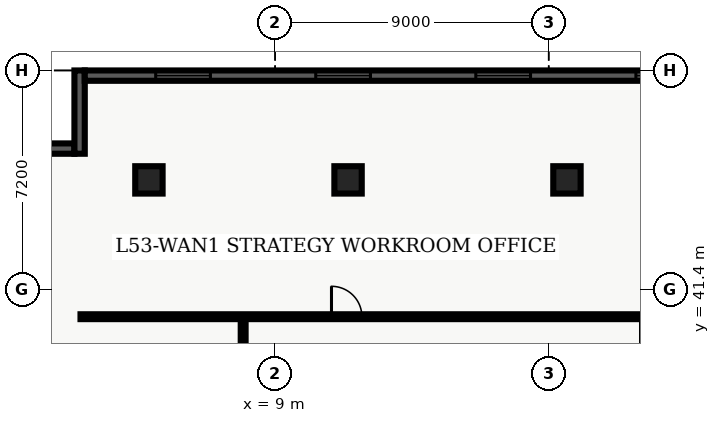
"""IFC4 building model, lengths in metres.
Left out: names, types, materials, properties, quantities, classifications, styles, units other than length and angle.
Written with IfcOpenShell. Run it as: python <this file> out.ifc"""

import sys

from ifc_helpers import new_model, entity, si_unit, converted_unit, direction, frame, origin_with_axes, origin_2d_with_axis, place, context, subcontext, project, spatial, polyline, rectangle, outline, extrude, element, fill, save


model = new_model("IFC4")
c1 = context("Model", 3, precision=1e-05, world=origin_with_axes(), true_north=direction((0.0, 1.0)))
c2 = subcontext(c1, "Body", "Model", "MODEL_VIEW")
j1 = project(units=[si_unit("LENGTHUNIT", "METRE"), converted_unit("PLANEANGLEUNIT", "DEGREE", entity("IfcPlaneAngleMeasure", 0.017), si_unit("PLANEANGLEUNIT", "RADIAN"), dimensions=[0, 0, 0, 0, 0, 0, 0])], contexts=[c1])
p1 = place(None, origin_with_axes())
s1 = spatial("IfcSite", under=j1, at=p1, CompositionType="ELEMENT")
p2 = place(p1, origin_with_axes())
s2 = spatial("IfcBuilding", under=s1, at=p2, CompositionType="ELEMENT")
p3 = place(p2, frame((0.0, 0.0, 216.0), z_axis=(0.0, 0.0, 1.0), x_axis=(1.0, 0.0, 0.0)))
s3 = spatial("IfcBuildingStorey", under=s2, at=p3, CompositionType="ELEMENT", Elevation=216.0)
for number, where, z_axis, x_axis in (
    (1, (11.4, 45.0, 0.0), (0.0, 0.0, 1.0), (1.0, 0.0, 0.0)),
    (2, (18.6, 45.0, 0.0), (0.0, 0.0, 1.0), (1.0, 0.0, 0.0)),
    (3, (4.85, 45.0, 0.0), (0.0, 0.0, 1.0), (1.0, 0.0, 0.0)),
):
    element("IfcColumn", number, at=place(p3, frame(where, z_axis=z_axis, x_axis=x_axis)), inside=s3, PredefinedType="COLUMN", context=c2, shape_type="SweptSolid", body=[
        extrude(rectangle(XDim=0.9, YDim=0.9, at=origin_2d_with_axis()), origin_with_axes(), (0.0, 0.0, 1.0), 3.9),
    ])
p4 = place(p3, frame((2.6, 40.5, 0.0), z_axis=(0.0, 0.0, 1.0), x_axis=(1.0, 0.0, 0.0)))
e4 = element("IfcWall", 4, at=p4, inside=s3, PredefinedType="PARTITIONING", context=c2, shape_type="SweptSolid", body=[
    extrude(outline(polyline([(0.0, -0.08), (29.465, -0.08), (29.465, 0.08), (0.0, 0.08), (0.0, -0.08)])), origin_with_axes(), (0.0, 0.0, 1.0), 2.64),
])
p5 = place(p4, frame((8.755, 0.0, 0.0), z_axis=(0.0, 0.0, 1.0), x_axis=(1.0, 0.0, 0.0)))
e5 = element("IfcOpeningElement", 5, at=p5, cuts=e4, PredefinedType="OPENING", context=c2, shape_type="SweptSolid", body=[
    extrude(rectangle(XDim=1.0, YDim=0.18, at=origin_2d_with_axis()), origin_with_axes(), (0.0, 0.0, 1.0), 2.15),
])
p6 = place(p3, frame((7.95, 7.8, 0.0), z_axis=(0.0, 0.0, 1.0), x_axis=(0.0, 1.0, 0.0)))
e6 = element("IfcWall", 6, at=p6, inside=s3, PredefinedType="PARTITIONING", context=c2, shape_type="SweptSolid", body=[
    extrude(outline(polyline([(0.0, -0.08), (32.7, -0.08), (32.7, 0.08), (0.0, 0.08), (0.0, -0.08)])), origin_with_axes(), (0.0, 0.0, 1.0), 2.64),
])
p7 = place(p6, frame((2.739, 0.0, 0.0), z_axis=(0.0, 0.0, 1.0), x_axis=(1.0, 0.0, 0.0)))
e7 = element("IfcOpeningElement", 7, at=p7, cuts=e6, PredefinedType="OPENING", context=c2, shape_type="SweptSolid", body=[
    extrude(rectangle(XDim=1.0, YDim=0.18, at=origin_2d_with_axis()), origin_with_axes(), (0.0, 0.0, 1.0), 2.15),
])
p8 = place(p6, frame((8.441, 0.0, 0.0), z_axis=(0.0, 0.0, 1.0), x_axis=(1.0, 0.0, 0.0)))
e8 = element("IfcOpeningElement", 8, at=p8, cuts=e6, PredefinedType="OPENING", context=c2, shape_type="SweptSolid", body=[
    extrude(rectangle(XDim=1.0, YDim=0.18, at=origin_2d_with_axis()), origin_with_axes(), (0.0, 0.0, 1.0), 2.15),
])
p9 = place(p6, frame((15.172, 0.0, 0.0), z_axis=(0.0, 0.0, 1.0), x_axis=(1.0, 0.0, 0.0)))
e9 = element("IfcOpeningElement", 9, at=p9, cuts=e6, PredefinedType="OPENING", context=c2, shape_type="SweptSolid", body=[
    extrude(rectangle(XDim=1.0, YDim=0.18, at=origin_2d_with_axis()), origin_with_axes(), (0.0, 0.0, 1.0), 2.15),
])
p10 = place(p6, frame((20.736, 0.0, 0.0), z_axis=(0.0, 0.0, 1.0), x_axis=(1.0, 0.0, 0.0)))
e10 = element("IfcOpeningElement", 10, at=p10, cuts=e6, PredefinedType="OPENING", context=c2, shape_type="SweptSolid", body=[
    extrude(rectangle(XDim=1.0, YDim=0.18, at=origin_2d_with_axis()), origin_with_axes(), (0.0, 0.0, 1.0), 2.15),
])
p11 = place(p6, frame((24.909, 0.0, 0.0), z_axis=(0.0, 0.0, 1.0), x_axis=(1.0, 0.0, 0.0)))
e11 = element("IfcOpeningElement", 11, at=p11, cuts=e6, PredefinedType="OPENING", context=c2, shape_type="SweptSolid", body=[
    extrude(rectangle(XDim=1.0, YDim=0.18, at=origin_2d_with_axis()), origin_with_axes(), (0.0, 0.0, 1.0), 2.15),
])
p12 = place(p6, frame((29.862, 0.0, 0.0), z_axis=(0.0, 0.0, 1.0), x_axis=(1.0, 0.0, 0.0)))
e12 = element("IfcOpeningElement", 12, at=p12, cuts=e6, PredefinedType="OPENING", context=c2, shape_type="SweptSolid", body=[
    extrude(rectangle(XDim=1.0, YDim=0.18, at=origin_2d_with_axis()), origin_with_axes(), (0.0, 0.0, 1.0), 2.15),
])
p13 = place(p3, frame((0.34, 46.03, 0.0), z_axis=(0.0, 0.0, 1.0), x_axis=(1.0, 0.0, 0.0)))
e13 = element("IfcWall", 13, at=p13, inside=s3, PredefinedType="SOLIDWALL", context=c2, shape_type="SweptSolid", body=[
    extrude(outline(polyline([(0.0, -0.17), (2.06, -0.17), (2.06, 0.17), (0.0, 0.17), (0.0, -0.17)])), origin_with_axes(), (0.0, 0.0, 1.0), 3.6),
])
p14 = place(p3, frame((2.57, 45.86, 0.0), z_axis=(0.0, 0.0, 1.0), x_axis=(0.0, 1.0, 0.0)))
e14 = element("IfcWall", 14, at=p14, inside=s3, PredefinedType="SOLIDWALL", context=c2, shape_type="SweptSolid", body=[
    extrude(outline(polyline([(0.0, -0.17), (2.74, -0.17), (2.74, 0.17), (0.0, 0.17), (0.0, -0.17)])), origin_with_axes(), (0.0, 0.0, 1.0), 3.6),
])
p15 = place(p3, frame((2.74, 48.43, 0.0), z_axis=(0.0, 0.0, 1.0), x_axis=(1.0, 0.0, 0.0)))
e15 = element("IfcWall", 15, at=p15, inside=s3, PredefinedType="SOLIDWALL", context=c2, shape_type="SweptSolid", body=[
    extrude(outline(polyline([(0.0, -0.17), (22.26, -0.17), (22.26, 0.17), (0.0, 0.17), (0.0, -0.17)])), origin_with_axes(), (0.0, 0.0, 1.0), 3.6),
])
p16 = place(p15, frame((3.233, 0.0, 0.45), z_axis=(0.0, 0.0, 1.0), x_axis=(1.0, 0.0, 0.0)))
e16 = element("IfcOpeningElement", 16, at=p16, cuts=e15, PredefinedType="OPENING", context=c2, shape_type="SweptSolid", body=[
    extrude(rectangle(XDim=1.8, YDim=0.36, at=origin_2d_with_axis()), origin_with_axes(), (0.0, 0.0, 1.0), 2.1),
])
p17 = place(p15, frame((8.497, 0.0, 0.45), z_axis=(0.0, 0.0, 1.0), x_axis=(1.0, 0.0, 0.0)))
e17 = element("IfcOpeningElement", 17, at=p17, cuts=e15, PredefinedType="OPENING", context=c2, shape_type="SweptSolid", body=[
    extrude(rectangle(XDim=1.8, YDim=0.36, at=origin_2d_with_axis()), origin_with_axes(), (0.0, 0.0, 1.0), 2.1),
])
p18 = place(p15, frame((13.762, 0.0, 0.45), z_axis=(0.0, 0.0, 1.0), x_axis=(1.0, 0.0, 0.0)))
e18 = element("IfcOpeningElement", 18, at=p18, cuts=e15, PredefinedType="OPENING", context=c2, shape_type="SweptSolid", body=[
    extrude(rectangle(XDim=1.8, YDim=0.36, at=origin_2d_with_axis()), origin_with_axes(), (0.0, 0.0, 1.0), 2.1),
])
p19 = place(p15, frame((19.028, 0.0, 0.45), z_axis=(0.0, 0.0, 1.0), x_axis=(1.0, 0.0, 0.0)))
e19 = element("IfcOpeningElement", 19, at=p19, cuts=e15, PredefinedType="OPENING", context=c2, shape_type="SweptSolid", body=[
    extrude(rectangle(XDim=1.8, YDim=0.36, at=origin_2d_with_axis()), origin_with_axes(), (0.0, 0.0, 1.0), 2.1),
])
p20 = place(p4, frame((8.755, 0.0, 0.0), z_axis=(0.0, 0.0, 1.0), x_axis=(1.0, 0.0, 0.0)))
e20 = element("IfcDoor", 20, at=p20, inside=s3, OperationType="SINGLE_SWING_LEFT", PredefinedType="DOOR", context=c2, shape_type="SweptSolid", body=[
    extrude(rectangle(XDim=1.0, YDim=0.09, at=origin_2d_with_axis()), origin_with_axes(), (0.0, 0.0, 1.0), 2.15),
])
fill(e5, e20)
p21 = place(p15, frame((3.233, 0.0, 0.45), z_axis=(0.0, 0.0, 1.0), x_axis=(1.0, 0.0, 0.0)))
e21 = element("IfcWindow", 21, at=p21, inside=s3, PredefinedType="WINDOW", context=c2, shape_type="SweptSolid", body=[
    extrude(rectangle(XDim=1.8, YDim=0.09, at=origin_2d_with_axis()), origin_with_axes(), (0.0, 0.0, 1.0), 2.1),
])
fill(e16, e21)
p22 = place(p15, frame((8.497, 0.0, 0.45), z_axis=(0.0, 0.0, 1.0), x_axis=(1.0, 0.0, 0.0)))
e22 = element("IfcWindow", 22, at=p22, inside=s3, PredefinedType="WINDOW", context=c2, shape_type="SweptSolid", body=[
    extrude(rectangle(XDim=1.8, YDim=0.09, at=origin_2d_with_axis()), origin_with_axes(), (0.0, 0.0, 1.0), 2.1),
])
fill(e17, e22)
p23 = place(p15, frame((13.762, 0.0, 0.45), z_axis=(0.0, 0.0, 1.0), x_axis=(1.0, 0.0, 0.0)))
e23 = element("IfcWindow", 23, at=p23, inside=s3, PredefinedType="WINDOW", context=c2, shape_type="SweptSolid", body=[
    extrude(rectangle(XDim=1.8, YDim=0.09, at=origin_2d_with_axis()), origin_with_axes(), (0.0, 0.0, 1.0), 2.1),
])
fill(e18, e23)
p24 = place(p15, frame((19.028, 0.0, 0.45), z_axis=(0.0, 0.0, 1.0), x_axis=(1.0, 0.0, 0.0)))
e24 = element("IfcWindow", 24, at=p24, inside=s3, PredefinedType="WINDOW", context=c2, shape_type="SweptSolid", body=[
    extrude(rectangle(XDim=1.8, YDim=0.09, at=origin_2d_with_axis()), origin_with_axes(), (0.0, 0.0, 1.0), 2.1),
])
fill(e19, e24)
save(model, sys.argv[1])
